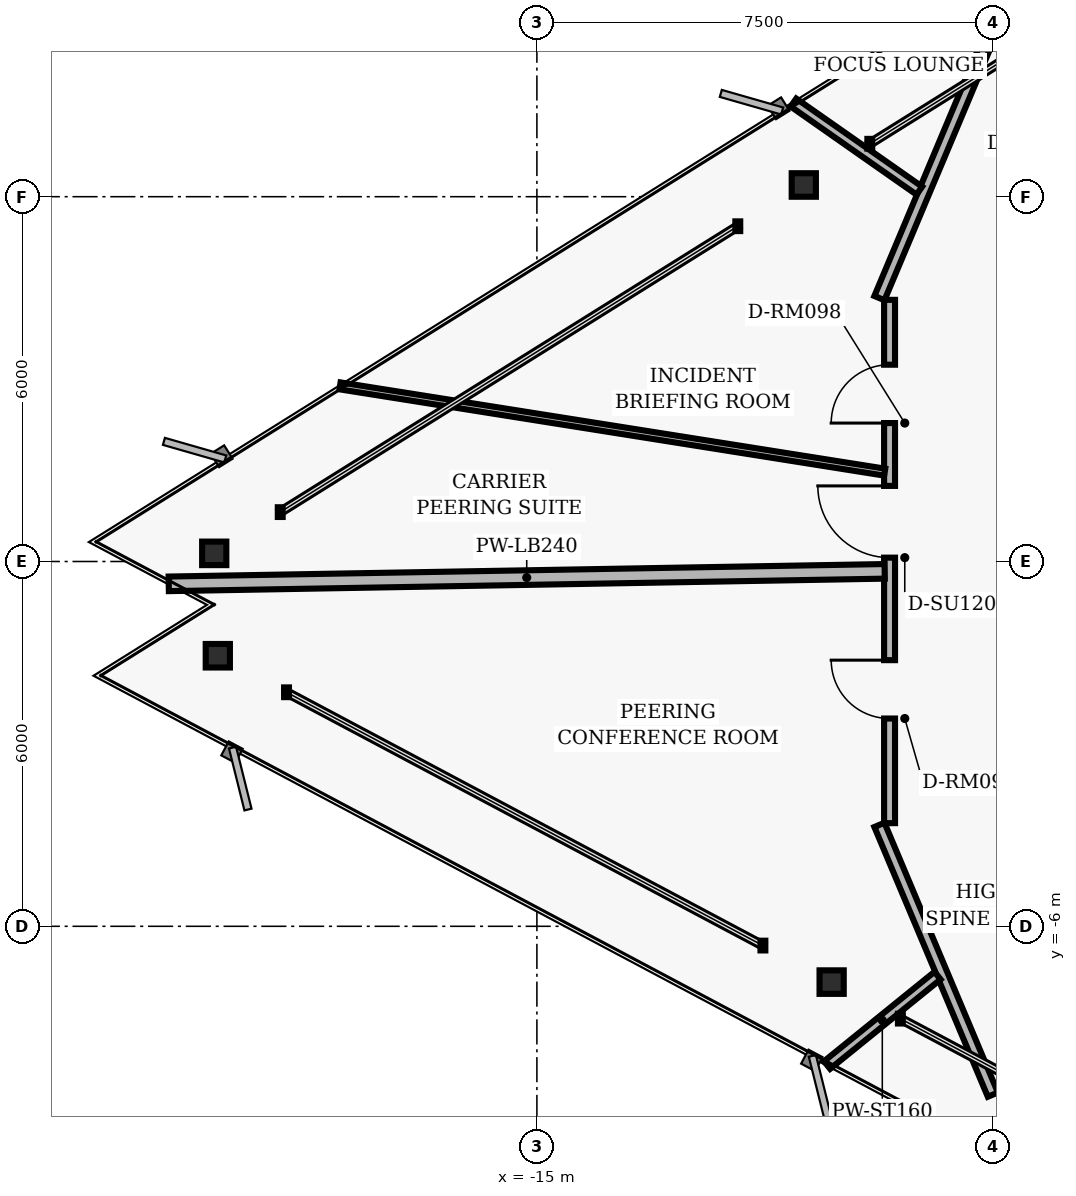
"""IFC4 building model, lengths in metres.
Left out: names, types, materials, properties, quantities, classifications, styles, units other than length and angle.
Written with IfcOpenShell. Run it as: python <this file> out.ifc"""

import sys

from ifc_helpers import new_model, si_unit, direction, frame, frame_2d, origin, origin_2d, place, context, subcontext, project, spatial, rectangle, i_section, extrude, element, fill, save


model = new_model("IFC4")
c1 = context("Model", 3, precision=1e-05, world=origin(), true_north=direction((0.0, 1.0)))
c2 = subcontext(c1, "Body", "Model", "MODEL_VIEW")
j1 = project(units=[si_unit("LENGTHUNIT", "METRE"), si_unit("PLANEANGLEUNIT", "RADIAN")], contexts=[c1])
p1 = place(None, origin())
s1 = spatial("IfcSite", under=j1, at=p1, CompositionType="ELEMENT")
p2 = place(p1, origin())
s2 = spatial("IfcBuilding", under=s1, at=p2, CompositionType="ELEMENT")
p3 = place(p2, frame((0.0, 0.0, 199.68)))
s3 = spatial("IfcBuildingStorey", under=s2, at=p3, CompositionType="ELEMENT", Elevation=199.68)
for number, where, z_axis, x_axis in (
    (1, (-10.611, 6.193, 0.0), (0.0, 0.0, 1.0), (1.0, 0.0, 0.0)),
    (2, (-20.307, 0.134, 0.0), (0.0, 0.0, 1.0), (1.0, 0.0, 0.0)),
    (3, (-20.248, -1.55, 0.0), (0.0, 0.0, 1.0), (1.0, 0.0, 0.0)),
    (4, (-10.153, -6.918, 0.0), (0.0, 0.0, 1.0), (1.0, 0.0, 0.0)),
):
    element("IfcColumn", number, at=place(p3, frame(where, z_axis=z_axis, x_axis=x_axis)), inside=s3, PredefinedType="COLUMN", context=c2, shape_type="SweptSolid", body=[
        extrude(i_section(OverallWidth=0.398, OverallDepth=0.387, WebThickness=0.021, FlangeThickness=0.033, FilletRadius=0.018, at=origin_2d()), origin(), (0.0, 0.0, 1.0), 3.04),
    ])
p4 = place(p3, frame((-7.501, -8.769, 0.0), z_axis=(0.0, 0.0, 1.0), x_axis=(-0.387573945081, 0.921838617706, 0.0)))
e5 = element("IfcWall", 5, at=p4, inside=s3, PredefinedType="PARTITIONING", context=c2, shape_type="SweptSolid", body=[
    extrude(rectangle(XDim=4.813, YDim=0.18, at=frame_2d((2.407, 0.0))), origin(), (0.0, 0.0, 1.0), 2.773),
])
p5 = place(p3, frame((-9.2, -4.303, 0.0), z_axis=(0.0, 0.0, 1.0), x_axis=(0.0, 1.0, 0.0)))
e6 = element("IfcWall", 6, at=p5, inside=s3, PredefinedType="PARTITIONING", context=c2, shape_type="SweptSolid", body=[
    extrude(rectangle(XDim=8.607, YDim=0.18, at=frame_2d((4.303, 0.0))), origin(), (0.0, 0.0, 1.0), 2.773),
])
p6 = place(p5, frame((1.721, 0.0, 0.0)))
e7 = element("IfcOpeningElement", 7, at=p6, cuts=e6, PredefinedType="OPENING", context=c2, shape_type="SweptSolid", body=[
    extrude(rectangle(XDim=0.96, YDim=2.02, at=frame_2d((0.48, 1.01))), frame((0.0, 0.1, 0.0), z_axis=(0.0, -1.0, 0.0), x_axis=(1.0, 0.0, 0.0)), (0.0, 0.0, 1.0), 0.2),
])
p7 = place(p5, frame((6.58, 0.0, 0.0)))
e8 = element("IfcOpeningElement", 8, at=p7, cuts=e6, PredefinedType="OPENING", context=c2, shape_type="SweptSolid", body=[
    extrude(rectangle(XDim=0.96, YDim=2.02, at=frame_2d((0.48, 1.01))), frame((0.0, 0.1, 0.0), z_axis=(0.0, -1.0, 0.0), x_axis=(1.0, 0.0, 0.0)), (0.0, 0.0, 1.0), 0.2),
])
p8 = place(p5, frame((4.367, 0.0, 0.0)))
e9 = element("IfcOpeningElement", 9, at=p8, cuts=e6, PredefinedType="OPENING", context=c2, shape_type="SweptSolid", body=[
    extrude(rectangle(XDim=1.18, YDim=2.02, at=frame_2d((0.59, 1.01))), frame((0.0, 0.1, 0.0), z_axis=(0.0, -1.0, 0.0), x_axis=(1.0, 0.0, 0.0)), (0.0, 0.0, 1.0), 0.2),
])
p9 = place(p3, frame((-9.367, 4.332, 0.0), z_axis=(0.0, 0.0, 1.0), x_axis=(0.387573945081, 0.921838617706, 0.0)))
e10 = element("IfcWall", 10, at=p9, inside=s3, PredefinedType="PARTITIONING", context=c2, shape_type="SweptSolid", body=[
    extrude(rectangle(XDim=4.813, YDim=0.18, at=frame_2d((2.407, 0.0))), origin(), (0.0, 0.0, 1.0), 2.773),
])
p10 = place(p3, frame((-9.28, -0.162, 0.0), z_axis=(0.0, 0.0, 1.0), x_axis=(-0.999847998997, -0.017434990714, 0.0)))
e11 = element("IfcWall", 11, at=p10, inside=s3, PredefinedType="PARTITIONING", context=c2, shape_type="SweptSolid", body=[
    extrude(rectangle(XDim=11.776, YDim=0.24, at=frame_2d((5.888, 0.0))), origin(), (0.0, 0.0, 1.0), 2.253),
])
p11 = place(p3, frame((-8.411, -6.811, 0.0), z_axis=(0.0, 0.0, 1.0), x_axis=(-0.777176762159, -0.629282353448, 0.0)))
e12 = element("IfcWall", 12, at=p11, inside=s3, PredefinedType="PARTITIONING", context=c2, shape_type="SweptSolid", body=[
    extrude(rectangle(XDim=2.337, YDim=0.16, at=frame_2d((1.169, 0.0))), origin(), (0.0, 0.0, 1.0), 2.773),
])
p12 = place(p3, frame((-8.71, 6.099, 0.0), z_axis=(0.0, 0.0, 1.0), x_axis=(-0.819154754917, 0.573572565154, 0.0)))
e13 = element("IfcWall", 13, at=p12, inside=s3, PredefinedType="PARTITIONING", context=c2, shape_type="SweptSolid", body=[
    extrude(rectangle(XDim=2.527, YDim=0.16, at=frame_2d((1.264, 0.0))), origin(), (0.0, 0.0, 1.0), 2.773),
])
p13 = place(p3, frame((-9.28, 1.47, 0.0), z_axis=(0.0, 0.0, 1.0), x_axis=(-0.987686019225, 0.156449120891, 0.0)))
e14 = element("IfcWall", 14, at=p13, inside=s3, PredefinedType="MOVABLE", context=c2, shape_type="SweptSolid", body=[
    extrude(rectangle(XDim=9.07, YDim=0.115, at=frame_2d((4.535, 0.0))), origin(), (0.0, 0.0, 1.0), 2.773),
])
p14 = place(p6, origin())
e15 = element("IfcDoor", 15, at=p14, inside=s3, OperationType="SINGLE_SWING_RIGHT", PredefinedType="DOOR", context=c2, shape_type="SweptSolid", body=[
    extrude(rectangle(XDim=0.96, YDim=2.02, at=frame_2d((0.48, 1.01))), frame((0.0, 0.025, 0.0), z_axis=(0.0, -1.0, 0.0), x_axis=(1.0, 0.0, 0.0)), (0.0, 0.0, 1.0), 0.05),
])
fill(e7, e15)
p15 = place(p7, origin())
e16 = element("IfcDoor", 16, at=p15, inside=s3, OperationType="SINGLE_SWING_LEFT", PredefinedType="DOOR", context=c2, shape_type="SweptSolid", body=[
    extrude(rectangle(XDim=0.96, YDim=2.02, at=frame_2d((0.48, 1.01))), frame((0.0, 0.025, 0.0), z_axis=(0.0, -1.0, 0.0), x_axis=(1.0, 0.0, 0.0)), (0.0, 0.0, 1.0), 0.05),
])
fill(e8, e16)
p16 = place(p8, origin())
e17 = element("IfcDoor", 17, at=p16, inside=s3, OperationType="SINGLE_SWING_RIGHT", PredefinedType="DOOR", context=c2, shape_type="SweptSolid", body=[
    extrude(rectangle(XDim=1.18, YDim=2.02, at=frame_2d((0.59, 1.01))), frame((0.0, 0.025, 0.0), z_axis=(0.0, -1.0, 0.0), x_axis=(1.0, 0.0, 0.0)), (0.0, 0.0, 1.0), 0.05),
])
fill(e9, e17)
save(model, sys.argv[1])
